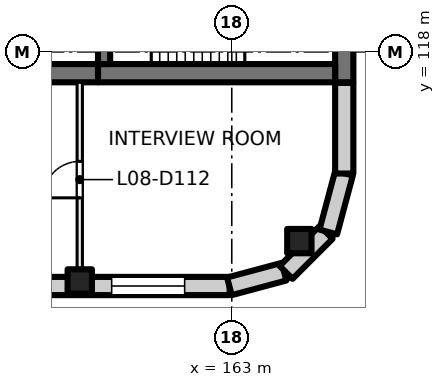
"""IFC4 building model, lengths in metres.
Left out: names, types, materials, properties, quantities, classifications, styles, units other than length and angle.
Written with IfcOpenShell. Run it as: python <this file> out.ifc"""

import sys

from ifc_helpers import new_model, si_unit, direction, frame, frame_2d, origin, origin_2d, place, context, subcontext, project, spatial, rectangle, extrude, element, fill, save


model = new_model("IFC4")
c1 = context("Model", 3, precision=1e-05, world=origin(), true_north=direction((0.0, 1.0)))
c2 = subcontext(c1, "Body", "Model", "MODEL_VIEW")
j1 = project(units=[si_unit("LENGTHUNIT", "METRE"), si_unit("PLANEANGLEUNIT", "RADIAN")], contexts=[c1])
p1 = place(None, origin())
s1 = spatial("IfcSite", under=j1, at=p1, CompositionType="ELEMENT")
p2 = place(p1, origin())
s2 = spatial("IfcBuilding", under=s1, at=p2, CompositionType="ELEMENT")
p3 = place(p2, frame((0.0, 0.0, 39.5)))
s3 = spatial("IfcBuildingStorey", under=s2, at=p3, CompositionType="ELEMENT", Elevation=39.5)
for number, where, z_axis, x_axis in (
    (1, (165.223, 111.777, 0.0), (0.0, 0.0, 1.0), (1.0, 0.0, 0.0)),
    (2, (158.0, 110.45, 0.0), (0.0, 0.0, 1.0), (1.0, 0.0, 0.0)),
):
    element("IfcColumn", number, at=place(p3, frame(where, z_axis=z_axis, x_axis=x_axis)), inside=s3, PredefinedType="COLUMN", context=c2, shape_type="SweptSolid", body=[
        extrude(rectangle(XDim=0.8, YDim=0.8, at=origin_2d()), origin(), (0.0, 0.0, 1.0), 4.0),
    ])
p4 = place(p3, frame((166.7, 120.8, 0.0), z_axis=(0.0, 0.0, 1.0), x_axis=(0.0, -1.0, 0.0)))
e3 = element("IfcWall", 3, at=p4, inside=s3, PredefinedType="SHEAR", context=c2, shape_type="SweptSolid", body=[
    extrude(rectangle(XDim=3.8, YDim=0.6, at=frame_2d((1.9, 0.0))), origin(), (0.0, 0.0, 1.0), 4.0),
])
p5 = place(p3, frame((166.4, 117.3, 0.0), z_axis=(0.0, 0.0, 1.0), x_axis=(-1.0, 0.0, 0.0)))
e4 = element("IfcWall", 4, at=p5, inside=s3, PredefinedType="SHEAR", context=c2, shape_type="SweptSolid", body=[
    extrude(rectangle(XDim=7.8, YDim=0.6, at=frame_2d((3.9, 0.0))), origin(), (0.0, 0.0, 1.0), 4.0),
])
p6 = place(p3, frame((158.6, 117.3, 0.0), z_axis=(0.0, 0.0, 1.0), x_axis=(-1.0, 0.0, 0.0)))
e5 = element("IfcWall", 5, at=p6, inside=s3, PredefinedType="SHEAR", context=c2, shape_type="SweptSolid", body=[
    extrude(rectangle(XDim=4.6, YDim=0.6, at=frame_2d((2.3, 0.0))), origin(), (0.0, 0.0, 1.0), 4.0),
])
p7 = place(p3, frame((158.8, 120.4, 0.0), z_axis=(0.0, 0.0, 1.0), x_axis=(0.0, -1.0, 0.0)))
e6 = element("IfcWall", 6, at=p7, inside=s3, PredefinedType="SHEAR", context=c2, shape_type="SweptSolid", body=[
    extrude(rectangle(XDim=2.8, YDim=0.4, at=frame_2d((1.4, 0.0))), origin(), (0.0, 0.0, 1.0), 4.0),
])
p8 = place(p7, frame((0.9, 0.0, 0.0)))
e7 = element("IfcOpeningElement", 7, at=p8, cuts=e6, PredefinedType="OPENING", context=c2, shape_type="SweptSolid", body=[
    extrude(rectangle(XDim=1.0, YDim=2.1, at=frame_2d((0.5, 1.05))), frame((0.0, 0.21, 0.0), z_axis=(0.0, -1.0, 0.0), x_axis=(1.0, 0.0, 0.0)), (0.0, 0.0, 1.0), 0.42),
])
p9 = place(p3, frame((162.93, 110.3, 0.0), z_axis=(0.0, 0.0, 1.0), x_axis=(-1.0, 0.0, 0.0)))
e8 = element("IfcWall", 8, at=p9, inside=s3, PredefinedType="SOLIDWALL", context=c2, shape_type="SweptSolid", body=[
    extrude(rectangle(XDim=31.93, YDim=0.6, at=frame_2d((15.965, 0.0))), origin(), (0.0, 0.0, 1.0), 3.625),
])
p10 = place(p9, frame((1.48, 0.0, 0.9)))
e9 = element("IfcOpeningElement", 9, at=p10, cuts=e8, PredefinedType="OPENING", context=c2, shape_type="SweptSolid", body=[
    extrude(rectangle(XDim=2.4, YDim=2.4, at=frame_2d((1.2, 1.2))), frame((0.0, 0.31, 0.0), z_axis=(0.0, -1.0, 0.0), x_axis=(1.0, 0.0, 0.0)), (0.0, 0.0, 1.0), 0.62),
])
p11 = place(p9, frame((5.98, 0.0, 0.9)))
e10 = element("IfcOpeningElement", 10, at=p11, cuts=e8, PredefinedType="OPENING", context=c2, shape_type="SweptSolid", body=[
    extrude(rectangle(XDim=2.4, YDim=2.4, at=frame_2d((1.2, 1.2))), frame((0.0, 0.31, 0.0), z_axis=(0.0, -1.0, 0.0), x_axis=(1.0, 0.0, 0.0)), (0.0, 0.0, 1.0), 0.62),
])
p12 = place(p9, frame((10.48, 0.0, 0.9)))
e11 = element("IfcOpeningElement", 11, at=p12, cuts=e8, PredefinedType="OPENING", context=c2, shape_type="SweptSolid", body=[
    extrude(rectangle(XDim=2.4, YDim=2.4, at=frame_2d((1.2, 1.2))), frame((0.0, 0.31, 0.0), z_axis=(0.0, -1.0, 0.0), x_axis=(1.0, 0.0, 0.0)), (0.0, 0.0, 1.0), 0.62),
])
p13 = place(p9, frame((14.98, 0.0, 0.9)))
e12 = element("IfcOpeningElement", 12, at=p13, cuts=e8, PredefinedType="OPENING", context=c2, shape_type="SweptSolid", body=[
    extrude(rectangle(XDim=2.4, YDim=2.4, at=frame_2d((1.2, 1.2))), frame((0.0, 0.31, 0.0), z_axis=(0.0, -1.0, 0.0), x_axis=(1.0, 0.0, 0.0)), (0.0, 0.0, 1.0), 0.62),
])
p14 = place(p9, frame((19.48, 0.0, 0.9)))
e13 = element("IfcOpeningElement", 13, at=p14, cuts=e8, PredefinedType="OPENING", context=c2, shape_type="SweptSolid", body=[
    extrude(rectangle(XDim=2.4, YDim=2.4, at=frame_2d((1.2, 1.2))), frame((0.0, 0.31, 0.0), z_axis=(0.0, -1.0, 0.0), x_axis=(1.0, 0.0, 0.0)), (0.0, 0.0, 1.0), 0.62),
])
p15 = place(p9, frame((23.98, 0.0, 0.9)))
e14 = element("IfcOpeningElement", 14, at=p15, cuts=e8, PredefinedType="OPENING", context=c2, shape_type="SweptSolid", body=[
    extrude(rectangle(XDim=2.4, YDim=2.4, at=frame_2d((1.2, 1.2))), frame((0.0, 0.31, 0.0), z_axis=(0.0, -1.0, 0.0), x_axis=(1.0, 0.0, 0.0)), (0.0, 0.0, 1.0), 0.62),
])
p16 = place(p9, frame((28.48, 0.0, 0.9)))
e15 = element("IfcOpeningElement", 15, at=p16, cuts=e8, PredefinedType="OPENING", context=c2, shape_type="SweptSolid", body=[
    extrude(rectangle(XDim=2.4, YDim=2.4, at=frame_2d((1.2, 1.2))), frame((0.0, 0.31, 0.0), z_axis=(0.0, -1.0, 0.0), x_axis=(1.0, 0.0, 0.0)), (0.0, 0.0, 1.0), 0.62),
])
for number, where, z_axis, x_axis in (
    (16, (164.719, 110.771, 0.0), (0.0, 0.0, 1.0), (-0.966, -0.259, 0.0)),
    (17, (166.104, 112.064, 0.0), (0.0, 0.0, 1.0), (-0.707, -0.707, 0.0)),
):
    element("IfcWall", number, at=place(p3, frame(where, z_axis=z_axis, x_axis=x_axis)), inside=s3, PredefinedType="SOLIDWALL", context=c2, shape_type="SweptSolid", body=[
        extrude(rectangle(XDim=1.861, YDim=0.6, at=frame_2d((0.93, 0.0))), origin(), (0.0, 0.0, 1.0), 3.625),
    ])
p17 = place(p3, frame((166.692, 114.01, 0.0), z_axis=(0.0, 0.0, 1.0), x_axis=(-0.258839784042, -0.965920269068, 0.0)))
e18 = element("IfcWall", 18, at=p17, inside=s3, PredefinedType="SOLIDWALL", context=c2, shape_type="SweptSolid", body=[
    extrude(rectangle(XDim=2.0, YDim=0.6, at=frame_2d((1.0, 0.0))), origin(), (0.0, 0.0, 1.0), 3.625),
])
p18 = place(p3, frame((166.7, 116.98, 0.0), z_axis=(0.0, 0.0, 1.0), x_axis=(0.0, -1.0, 0.0)))
e19 = element("IfcWall", 19, at=p18, inside=s3, PredefinedType="SOLIDWALL", context=c2, shape_type="SweptSolid", body=[
    extrude(rectangle(XDim=2.98, YDim=0.6, at=frame_2d((1.49, 0.0))), origin(), (0.0, 0.0, 1.0), 3.625),
])
p19 = place(p3, frame((158.0, 110.6, 0.0), z_axis=(0.0, 0.0, 1.0), x_axis=(0.0, 1.0, 0.0)))
e20 = element("IfcWall", 20, at=p19, inside=s3, PredefinedType="PARTITIONING", context=c2, shape_type="SweptSolid", body=[
    extrude(rectangle(XDim=6.4, YDim=0.175, at=frame_2d((3.2, 0.0))), origin(), (0.0, 0.0, 1.0), 3.625),
])
p20 = place(p19, frame((2.6, 0.0, 0.0)))
e21 = element("IfcOpeningElement", 21, at=p20, cuts=e20, PredefinedType="OPENING", context=c2, shape_type="SweptSolid", body=[
    extrude(rectangle(XDim=1.2, YDim=2.1, at=frame_2d((0.6, 1.05))), frame((0.0, 0.097, 0.0), z_axis=(0.0, -1.0, 0.0), x_axis=(1.0, 0.0, 0.0)), (0.0, 0.0, 1.0), 0.195),
])
p21 = place(p10, origin())
e22 = element("IfcWindow", 22, at=p21, inside=s3, PartitioningType="SINGLE_PANEL", PredefinedType="WINDOW", context=c2, shape_type="SweptSolid", body=[
    extrude(rectangle(XDim=2.4, YDim=2.4, at=frame_2d((1.2, 1.2))), frame((0.0, 0.03, 0.0), z_axis=(0.0, -1.0, 0.0), x_axis=(1.0, 0.0, 0.0)), (0.0, 0.0, 1.0), 0.06),
])
fill(e9, e22)
p22 = place(p20, origin())
e23 = element("IfcDoor", 23, at=p22, inside=s3, OperationType="DOUBLE_DOOR_SINGLE_SWING", PredefinedType="DOOR", context=c2, shape_type="SweptSolid", body=[
    extrude(rectangle(XDim=1.2, YDim=2.1, at=frame_2d((0.6, 1.05))), frame((0.0, 0.025, 0.0), z_axis=(0.0, -1.0, 0.0), x_axis=(1.0, 0.0, 0.0)), (0.0, 0.0, 1.0), 0.05),
])
fill(e21, e23)
save(model, sys.argv[1])
